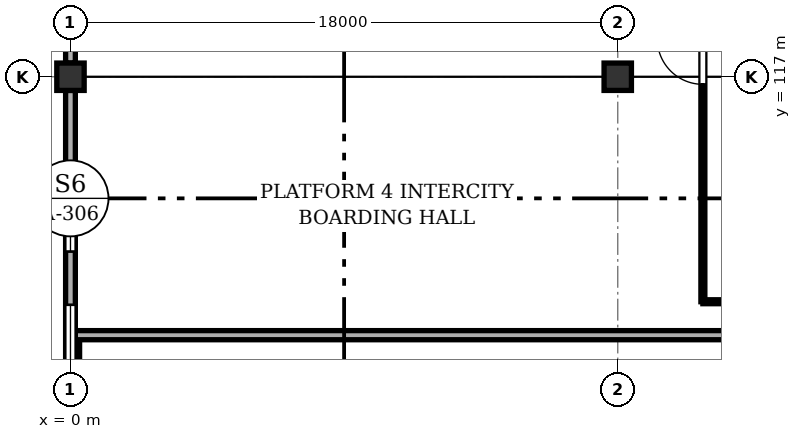
"""IFC4 building model, lengths in metres.
Left out: names, types, materials, properties, quantities, classifications, styles, units other than length and angle.
Written with IfcOpenShell. Run it as: python <this file> out.ifc"""

import sys

from ifc_helpers import new_model, si_unit, direction, frame, frame_2d, origin, origin_2d, place, context, subcontext, project, spatial, rectangle, extrude, element, fill, save


model = new_model("IFC4")
c1 = context("Model", 3, precision=1e-05, world=origin(), true_north=direction((0.0, 1.0)))
c2 = subcontext(c1, "Body", "Model", "MODEL_VIEW")
j1 = project(units=[si_unit("LENGTHUNIT", "METRE"), si_unit("PLANEANGLEUNIT", "RADIAN")], contexts=[c1])
p1 = place(None, origin())
s1 = spatial("IfcSite", under=j1, at=p1, CompositionType="ELEMENT")
p2 = place(p1, origin())
s2 = spatial("IfcBuilding", under=s1, at=p2, CompositionType="ELEMENT")
p3 = place(p2, origin())
s3 = spatial("IfcBuildingStorey", under=s2, at=p3, CompositionType="ELEMENT", Elevation=0.0)
for number, where, z_axis, x_axis in (
    (1, (0.0, 117.0, 0.0), (0.0, 0.0, 1.0), (1.0, 0.0, 0.0)),
    (2, (18.0, 117.0, 0.0), (0.0, 0.0, 1.0), (1.0, 0.0, 0.0)),
):
    element("IfcColumn", number, at=place(p3, frame(where, z_axis=z_axis, x_axis=x_axis)), inside=s3, PredefinedType="COLUMN", context=c2, shape_type="SweptSolid", body=[
        extrude(rectangle(XDim=0.9, YDim=0.9, at=origin_2d()), origin(), (0.0, 0.0, 1.0), 6.6),
    ])
p4 = place(p3, frame((0.15, 104.5, -1.25), z_axis=(0.0, 0.0, 1.0), x_axis=(0.0, 1.0, 0.0)))
e3 = element("IfcWall", 3, at=p4, inside=s3, PredefinedType="SOLIDWALL", context=c2, shape_type="SweptSolid", body=[
    extrude(rectangle(XDim=4.0, YDim=0.3, at=frame_2d((2.0, 0.0))), origin(), (0.0, 0.0, 1.0), 1.23),
])
p5 = place(p3, frame((0.15, 108.5, -1.25), z_axis=(0.0, 0.0, 1.0), x_axis=(1.0, 0.0, 0.0)))
e4 = element("IfcWall", 4, at=p5, inside=s3, PredefinedType="SOLIDWALL", context=c2, shape_type="SweptSolid", body=[
    extrude(rectangle(XDim=107.7, YDim=0.3, at=frame_2d((53.85, 0.0))), origin(), (0.0, 0.0, 1.0), 0.87),
])
p6 = place(p3, frame((0.0, 104.1, 0.0), z_axis=(0.0, 0.0, 1.0), x_axis=(0.0, 1.0, 0.0)))
e5 = element("IfcWall", 5, at=p6, inside=s3, PredefinedType="SOLIDWALL", context=c2, shape_type="SweptSolid", body=[
    extrude(rectangle(XDim=12.45, YDim=0.32, at=frame_2d((6.225, 0.0))), origin(), (0.0, 0.0, 1.0), 5.495),
])
p7 = place(p6, frame((3.0, 0.0, 0.95)))
e6 = element("IfcOpeningElement", 6, at=p7, cuts=e5, PredefinedType="OPENING", context=c2, shape_type="SweptSolid", body=[
    extrude(rectangle(XDim=2.4, YDim=2.1, at=frame_2d((1.2, 1.05))), frame((0.0, 0.17, 0.0), z_axis=(0.0, -1.0, 0.0), x_axis=(1.0, 0.0, 0.0)), (0.0, 0.0, 1.0), 0.34),
])
p8 = place(p6, frame((7.15, 0.0, 0.95)))
e7 = element("IfcOpeningElement", 7, at=p8, cuts=e5, PredefinedType="OPENING", context=c2, shape_type="SweptSolid", body=[
    extrude(rectangle(XDim=2.1, YDim=2.0, at=frame_2d((1.05, 1.0))), frame((0.0, 0.17, 0.0), z_axis=(0.0, -1.0, 0.0), x_axis=(1.0, 0.0, 0.0)), (0.0, 0.0, 1.0), 0.34),
])
p9 = place(p3, frame((0.0, 117.45, 0.0), z_axis=(0.0, 0.0, 1.0), x_axis=(0.0, 1.0, 0.0)))
e8 = element("IfcWall", 8, at=p9, inside=s3, PredefinedType="SOLIDWALL", context=c2, shape_type="SweptSolid", body=[
    extrude(rectangle(XDim=8.1, YDim=0.32, at=frame_2d((4.05, 0.0))), origin(), (0.0, 0.0, 1.0), 5.67),
])
p10 = place(p9, frame((3.15, 0.0, 0.95)))
e9 = element("IfcOpeningElement", 9, at=p10, cuts=e8, PredefinedType="OPENING", context=c2, shape_type="SweptSolid", body=[
    extrude(rectangle(XDim=1.8, YDim=2.0, at=frame_2d((0.9, 1.0))), frame((0.0, 0.17, 0.0), z_axis=(0.0, -1.0, 0.0), x_axis=(1.0, 0.0, 0.0)), (0.0, 0.0, 1.0), 0.34),
])
p11 = place(p3, frame((23.4, 109.6, 0.0), z_axis=(0.0, 0.0, 1.0), x_axis=(-1.0, 0.0, 0.0)))
e10 = element("IfcWall", 10, at=p11, inside=s3, PredefinedType="PARTITIONING", context=c2, shape_type="SweptSolid", body=[
    extrude(rectangle(XDim=2.6, YDim=0.13, at=frame_2d((1.3, 0.0))), origin(), (0.0, 0.0, 1.0), 4.4),
])
p12 = place(p3, frame((20.8, 109.6, 0.0), z_axis=(0.0, 0.0, 1.0), x_axis=(0.0, 1.0, 0.0)))
e11 = element("IfcWall", 11, at=p12, inside=s3, PredefinedType="PARTITIONING", context=c2, shape_type="SweptSolid", body=[
    extrude(rectangle(XDim=15.8, YDim=0.13, at=frame_2d((7.9, 0.0))), origin(), (0.0, 0.0, 1.0), 4.4),
])
p13 = place(p12, frame((7.15, 0.0, 0.0)))
e12 = element("IfcOpeningElement", 12, at=p13, cuts=e11, PredefinedType="OPENING", context=c2, shape_type="SweptSolid", body=[
    extrude(rectangle(XDim=1.5, YDim=2.15, at=frame_2d((0.75, 1.075))), frame((0.0, 0.075, 0.0), z_axis=(0.0, -1.0, 0.0), x_axis=(1.0, 0.0, 0.0)), (0.0, 0.0, 1.0), 0.15),
])
p14 = place(p7, origin())
e13 = element("IfcWindow", 13, at=p14, inside=s3, PartitioningType="SINGLE_PANEL", PredefinedType="WINDOW", context=c2, shape_type="SweptSolid", body=[
    extrude(rectangle(XDim=2.4, YDim=2.1, at=frame_2d((1.2, 1.05))), frame((0.0, 0.03, 0.0), z_axis=(0.0, -1.0, 0.0), x_axis=(1.0, 0.0, 0.0)), (0.0, 0.0, 1.0), 0.06),
])
fill(e6, e13)
p15 = place(p8, origin())
e14 = element("IfcWindow", 14, at=p15, inside=s3, PartitioningType="SINGLE_PANEL", PredefinedType="WINDOW", context=c2, shape_type="SweptSolid", body=[
    extrude(rectangle(XDim=2.1, YDim=2.0, at=frame_2d((1.05, 1.0))), frame((0.0, 0.03, 0.0), z_axis=(0.0, -1.0, 0.0), x_axis=(1.0, 0.0, 0.0)), (0.0, 0.0, 1.0), 0.06),
])
fill(e7, e14)
p16 = place(p13, origin())
e15 = element("IfcDoor", 15, at=p16, inside=s3, OperationType="SINGLE_SWING_RIGHT", PredefinedType="DOOR", context=c2, shape_type="SweptSolid", body=[
    extrude(rectangle(XDim=1.5, YDim=2.15, at=frame_2d((0.75, 1.075))), frame((0.0, 0.025, 0.0), z_axis=(0.0, -1.0, 0.0), x_axis=(1.0, 0.0, 0.0)), (0.0, 0.0, 1.0), 0.05),
])
fill(e12, e15)
save(model, sys.argv[1])
